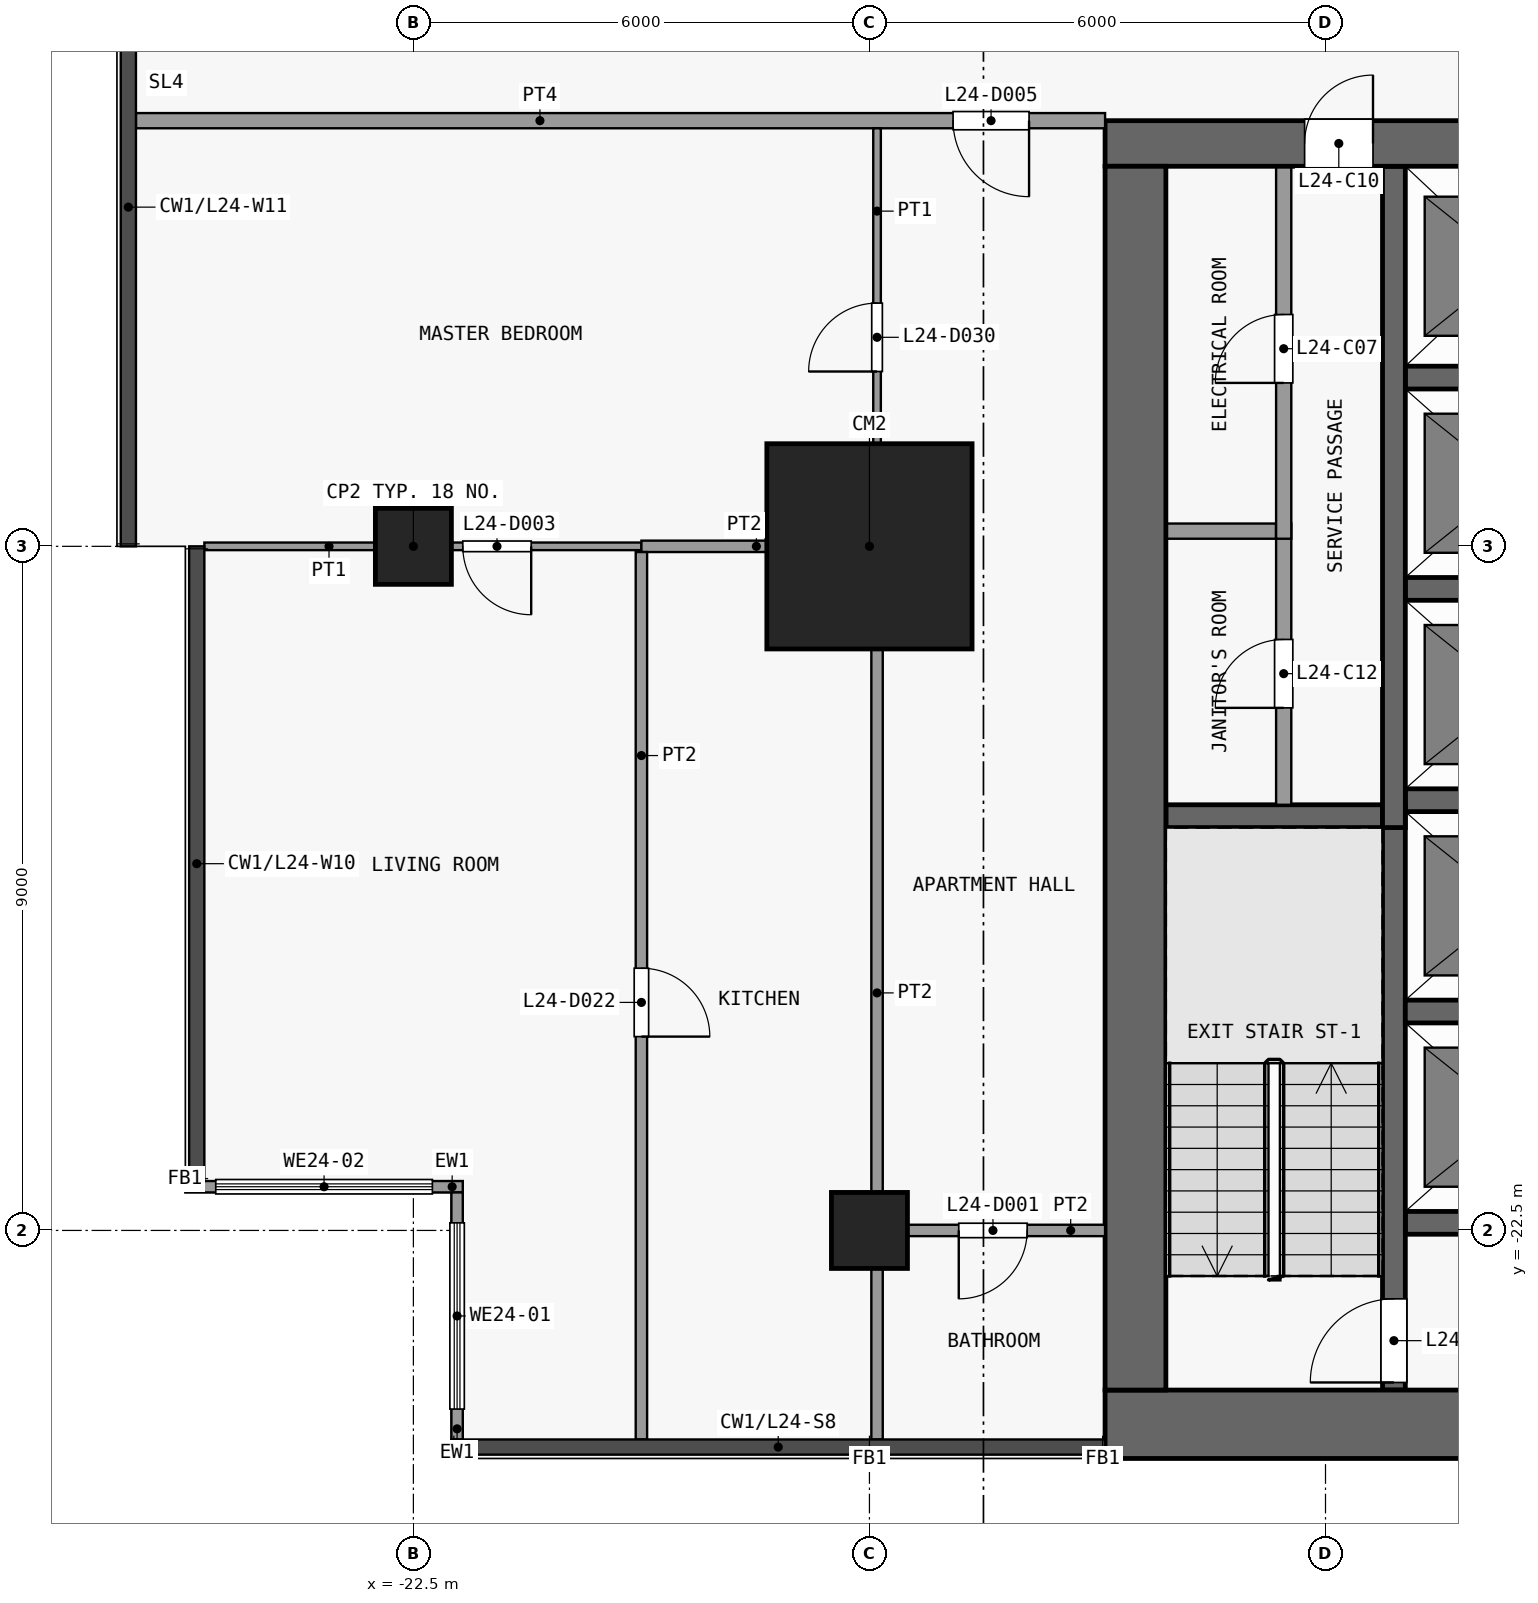
"""IFC4 building model, lengths in metres.
Left out: names, types, materials, properties, quantities, classifications, styles, units other than length and angle.
Written with IfcOpenShell. Run it as: python <this file> out.ifc"""

import sys

from ifc_helpers import new_model, si_unit, direction, frame, frame_2d, origin, origin_2d, place, context, subcontext, project, spatial, rectangle, extrude, element, fill, save


model = new_model("IFC4")
c1 = context("Model", 3, precision=1e-05, world=origin(), true_north=direction((0.0, 1.0)))
c2 = subcontext(c1, "Body", "Model", "MODEL_VIEW")
j1 = project(units=[si_unit("LENGTHUNIT", "METRE"), si_unit("PLANEANGLEUNIT", "RADIAN")], contexts=[c1])
p1 = place(None, origin())
s1 = spatial("IfcSite", under=j1, at=p1, CompositionType="ELEMENT")
p2 = place(p1, origin())
s2 = spatial("IfcBuilding", under=s1, at=p2, CompositionType="ELEMENT")
p3 = place(p2, frame((0.0, 0.0, 99.1)))
s3 = spatial("IfcBuildingStorey", under=s2, at=p3, CompositionType="ELEMENT", Elevation=99.1)
for number, where, z_axis, x_axis in (
    (1, (-22.5, -13.5, 0.0), (0.0, 0.0, 1.0), (1.0, 0.0, 0.0)),
    (2, (-16.5, -22.5, 0.0), (0.0, 0.0, 1.0), (1.0, 0.0, 0.0)),
):
    element("IfcColumn", number, at=place(p3, frame(where, z_axis=z_axis, x_axis=x_axis)), inside=s3, PredefinedType="COLUMN", context=c2, shape_type="SweptSolid", body=[
        extrude(rectangle(XDim=1.0, YDim=1.0, at=origin_2d()), origin(), (0.0, 0.0, 1.0), 3.6),
    ])
p4 = place(p3, frame((-16.5, -13.5, 0.0), z_axis=(0.0, 0.0, 1.0), x_axis=(1.0, 0.0, 0.0)))
e3 = element("IfcColumn", 3, at=p4, inside=s3, PredefinedType="COLUMN", context=c2, shape_type="SweptSolid", body=[
    extrude(rectangle(XDim=2.7, YDim=2.7, at=origin_2d()), origin(), (0.0, 0.0, 1.0), 3.6),
])
p5 = place(p3, frame((-13.4, -25.05, 0.0), z_axis=(0.0, 0.0, 1.0), x_axis=(1.0, 0.0, 0.0)))
e4 = element("IfcWall", 4, at=p5, inside=s3, PredefinedType="SHEAR", context=c2, shape_type="SweptSolid", body=[
    extrude(rectangle(XDim=26.8, YDim=0.9, at=frame_2d((13.4, 0.0))), origin(), (0.0, 0.0, 1.0), 3.3),
])
p6 = place(p3, frame((-13.4, -8.2, 0.0), z_axis=(0.0, 0.0, 1.0), x_axis=(1.0, 0.0, 0.0)))
e5 = element("IfcWall", 5, at=p6, inside=s3, PredefinedType="SHEAR", context=c2, shape_type="SweptSolid", body=[
    extrude(rectangle(XDim=26.8, YDim=0.6, at=frame_2d((13.4, 0.0))), origin(), (0.0, 0.0, 1.0), 3.3),
])
p7 = place(p6, frame((7.7, 0.0, 0.0)))
e6 = element("IfcOpeningElement", 6, at=p7, cuts=e5, PredefinedType="OPENING", context=c2, shape_type="SweptSolid", body=[
    extrude(rectangle(XDim=1.8, YDim=2.1, at=frame_2d((0.9, 1.05))), frame((0.0, 0.31, 0.0), z_axis=(0.0, -1.0, 0.0), x_axis=(1.0, 0.0, 0.0)), (0.0, 0.0, 1.0), 0.62),
])
p8 = place(p6, frame((17.3, 0.0, 0.0)))
e7 = element("IfcOpeningElement", 7, at=p8, cuts=e5, PredefinedType="OPENING", context=c2, shape_type="SweptSolid", body=[
    extrude(rectangle(XDim=1.8, YDim=2.1, at=frame_2d((0.9, 1.05))), frame((0.0, 0.31, 0.0), z_axis=(0.0, -1.0, 0.0), x_axis=(1.0, 0.0, 0.0)), (0.0, 0.0, 1.0), 0.62),
])
p9 = place(p6, frame((2.625, 0.0, 0.0)))
e8 = element("IfcOpeningElement", 8, at=p9, cuts=e5, PredefinedType="OPENING", context=c2, shape_type="SweptSolid", body=[
    extrude(rectangle(XDim=0.9, YDim=2.1, at=frame_2d((0.45, 1.05))), frame((0.0, 0.31, 0.0), z_axis=(0.0, -1.0, 0.0), x_axis=(1.0, 0.0, 0.0)), (0.0, 0.0, 1.0), 0.62),
])
p10 = place(p6, frame((23.275, 0.0, 0.0)))
e9 = element("IfcOpeningElement", 9, at=p10, cuts=e5, PredefinedType="OPENING", context=c2, shape_type="SweptSolid", body=[
    extrude(rectangle(XDim=0.9, YDim=2.1, at=frame_2d((0.45, 1.05))), frame((0.0, 0.31, 0.0), z_axis=(0.0, -1.0, 0.0), x_axis=(1.0, 0.0, 0.0)), (0.0, 0.0, 1.0), 0.62),
])
p11 = place(p3, frame((-13.0, -24.6, 0.0), z_axis=(0.0, 0.0, 1.0), x_axis=(0.0, 1.0, 0.0)))
e10 = element("IfcWall", 10, at=p11, inside=s3, PredefinedType="SHEAR", context=c2, shape_type="SweptSolid", body=[
    extrude(rectangle(XDim=16.1, YDim=0.8, at=frame_2d((8.05, 0.0))), origin(), (0.0, 0.0, 1.0), 3.3),
])
for number, where, z_axis, x_axis in (
    (11, (-9.45, -22.4, 0.0), (0.0, 0.0, 1.0), (1.0, 0.0, 0.0)),
    (12, (-9.45, -19.62, 0.0), (0.0, 0.0, 1.0), (1.0, 0.0, 0.0)),
):
    element("IfcWall", number, at=place(p3, frame(where, z_axis=z_axis, x_axis=x_axis)), inside=s3, PredefinedType="SHEAR", context=c2, shape_type="SweptSolid", body=[
        extrude(rectangle(XDim=2.8, YDim=0.3, at=frame_2d((1.4, 0.0))), origin(), (0.0, 0.0, 1.0), 3.3),
    ])
p12 = place(p3, frame((-12.6, -17.05, 0.0), z_axis=(0.0, 0.0, 1.0), x_axis=(1.0, 0.0, 0.0)))
e13 = element("IfcWall", 13, at=p12, inside=s3, PredefinedType="SHEAR", context=c2, shape_type="SweptSolid", body=[
    extrude(rectangle(XDim=2.85, YDim=0.3, at=frame_2d((1.425, 0.0))), origin(), (0.0, 0.0, 1.0), 3.3),
])
for number, where, z_axis, x_axis in (
    (14, (-9.45, -16.84, 0.0), (0.0, 0.0, 1.0), (1.0, 0.0, 0.0)),
    (15, (-9.45, -14.06, 0.0), (0.0, 0.0, 1.0), (1.0, 0.0, 0.0)),
):
    element("IfcWall", number, at=place(p3, frame(where, z_axis=z_axis, x_axis=x_axis)), inside=s3, PredefinedType="SHEAR", context=c2, shape_type="SweptSolid", body=[
        extrude(rectangle(XDim=2.8, YDim=0.3, at=frame_2d((1.4, 0.0))), origin(), (0.0, 0.0, 1.0), 3.3),
    ])
p13 = place(p3, frame((-12.6, -13.3, 0.0), z_axis=(0.0, 0.0, 1.0), x_axis=(1.0, 0.0, 0.0)))
e16 = element("IfcWall", 16, at=p13, inside=s3, PredefinedType="PARTITIONING", context=c2, shape_type="SweptSolid", body=[
    extrude(rectangle(XDim=1.45, YDim=0.2, at=frame_2d((0.725, 0.0))), origin(), (0.0, 0.0, 1.0), 3.3),
])
p14 = place(p3, frame((-9.45, -11.28, 0.0), z_axis=(0.0, 0.0, 1.0), x_axis=(1.0, 0.0, 0.0)))
e17 = element("IfcWall", 17, at=p14, inside=s3, PredefinedType="SHEAR", context=c2, shape_type="SweptSolid", body=[
    extrude(rectangle(XDim=2.8, YDim=0.3, at=frame_2d((1.4, 0.0))), origin(), (0.0, 0.0, 1.0), 3.3),
])
p15 = place(p3, frame((-11.05, -16.9, 0.0), z_axis=(0.0, 0.0, 1.0), x_axis=(0.0, 1.0, 0.0)))
e18 = element("IfcWall", 18, at=p15, inside=s3, PredefinedType="PARTITIONING", context=c2, shape_type="SweptSolid", body=[
    extrude(rectangle(XDim=3.7, YDim=0.2, at=frame_2d((1.85, 0.0))), origin(), (0.0, 0.0, 1.0), 3.3),
])
p16 = place(p15, frame((1.275, 0.0, 0.0)))
e19 = element("IfcOpeningElement", 19, at=p16, cuts=e18, PredefinedType="OPENING", context=c2, shape_type="SweptSolid", body=[
    extrude(rectangle(XDim=0.9, YDim=2.1, at=frame_2d((0.45, 1.05))), frame((0.0, 0.11, 0.0), z_axis=(0.0, -1.0, 0.0), x_axis=(1.0, 0.0, 0.0)), (0.0, 0.0, 1.0), 0.22),
])
p17 = place(p3, frame((-11.05, -13.4, 0.0), z_axis=(0.0, 0.0, 1.0), x_axis=(0.0, 1.0, 0.0)))
e20 = element("IfcWall", 20, at=p17, inside=s3, PredefinedType="PARTITIONING", context=c2, shape_type="SweptSolid", body=[
    extrude(rectangle(XDim=4.9, YDim=0.2, at=frame_2d((2.45, 0.0))), origin(), (0.0, 0.0, 1.0), 3.3),
])
p18 = place(p17, frame((2.05, 0.0, 0.0)))
e21 = element("IfcOpeningElement", 21, at=p18, cuts=e20, PredefinedType="OPENING", context=c2, shape_type="SweptSolid", body=[
    extrude(rectangle(XDim=0.9, YDim=2.1, at=frame_2d((0.45, 1.05))), frame((0.0, 0.11, 0.0), z_axis=(0.0, -1.0, 0.0), x_axis=(1.0, 0.0, 0.0)), (0.0, 0.0, 1.0), 0.22),
])
p19 = place(p3, frame((-9.6, -24.6, 0.0), z_axis=(0.0, 0.0, 1.0), x_axis=(0.0, 1.0, 0.0)))
e22 = element("IfcWall", 22, at=p19, inside=s3, PredefinedType="SHEAR", context=c2, shape_type="SweptSolid", body=[
    extrude(rectangle(XDim=7.7, YDim=0.3, at=frame_2d((3.85, 0.0))), origin(), (0.0, 0.0, 1.0), 3.3),
])
p20 = place(p19, frame((0.1, 0.0, 0.0)))
e23 = element("IfcOpeningElement", 23, at=p20, cuts=e22, PredefinedType="OPENING", context=c2, shape_type="SweptSolid", body=[
    extrude(rectangle(XDim=1.1, YDim=2.1, at=frame_2d((0.55, 1.05))), frame((0.0, 0.16, 0.0), z_axis=(0.0, -1.0, 0.0), x_axis=(1.0, 0.0, 0.0)), (0.0, 0.0, 1.0), 0.32),
])
p21 = place(p3, frame((-9.6, -17.2, 0.0), z_axis=(0.0, 0.0, 1.0), x_axis=(0.0, 1.0, 0.0)))
e24 = element("IfcWall", 24, at=p21, inside=s3, PredefinedType="SHEAR", context=c2, shape_type="SweptSolid", body=[
    extrude(rectangle(XDim=8.7, YDim=0.3, at=frame_2d((4.35, 0.0))), origin(), (0.0, 0.0, 1.0), 3.3),
])
p22 = place(p3, frame((-21.925, -25.25, 0.0), z_axis=(0.0, 0.0, 1.0), x_axis=(0.0, 1.0, 0.0)))
e25 = element("IfcWall", 25, at=p22, inside=s3, PredefinedType="SOLIDWALL", context=c2, shape_type="SweptSolid", body=[
    extrude(rectangle(XDim=3.25, YDim=0.15, at=frame_2d((1.625, 0.0))), origin(), (0.0, 0.0, 1.0), 3.3),
])
p23 = place(p22, frame((0.4, 0.0, 0.9)))
e26 = element("IfcOpeningElement", 26, at=p23, cuts=e25, PredefinedType="OPENING", context=c2, shape_type="SweptSolid", body=[
    extrude(rectangle(XDim=2.45, YDim=2.4, at=frame_2d((1.225, 1.2))), frame((0.0, 0.085, 0.0), z_axis=(0.0, -1.0, 0.0), x_axis=(1.0, 0.0, 0.0)), (0.0, 0.0, 1.0), 0.17),
])
p24 = place(p3, frame((-21.85, -21.925, 0.0), z_axis=(0.0, 0.0, 1.0), x_axis=(-1.0, 0.0, 0.0)))
e27 = element("IfcWall", 27, at=p24, inside=s3, PredefinedType="SOLIDWALL", context=c2, shape_type="SweptSolid", body=[
    extrude(rectangle(XDim=3.65, YDim=0.15, at=frame_2d((1.825, 0.0))), origin(), (0.0, 0.0, 1.0), 3.3),
])
p25 = place(p24, frame((0.4, 0.0, 0.9)))
e28 = element("IfcOpeningElement", 28, at=p25, cuts=e27, PredefinedType="OPENING", context=c2, shape_type="SweptSolid", body=[
    extrude(rectangle(XDim=2.85, YDim=2.4, at=frame_2d((1.425, 1.2))), frame((0.0, 0.085, 0.0), z_axis=(0.0, -1.0, 0.0), x_axis=(1.0, 0.0, 0.0)), (0.0, 0.0, 1.0), 0.17),
])
p26 = place(p3, frame((-16.325, -22.5, 0.0), z_axis=(0.0, 0.0, 1.0), x_axis=(1.0, 0.0, 0.0)))
e29 = element("IfcWall", 29, at=p26, inside=s3, PredefinedType="PARTITIONING", context=c2, shape_type="SweptSolid", body=[
    extrude(rectangle(XDim=2.925, YDim=0.15, at=frame_2d((1.462, 0.0))), origin(), (0.0, 0.0, 1.0), 3.3),
])
p27 = place(p26, frame((1.0, 0.0, 0.0)))
e30 = element("IfcOpeningElement", 30, at=p27, cuts=e29, PredefinedType="OPENING", context=c2, shape_type="SweptSolid", body=[
    extrude(rectangle(XDim=0.9, YDim=2.1, at=frame_2d((0.45, 1.05))), frame((0.0, 0.085, 0.0), z_axis=(0.0, -1.0, 0.0), x_axis=(1.0, 0.0, 0.0)), (0.0, 0.0, 1.0), 0.17),
])
p28 = place(p3, frame((-25.25, -13.5, 0.0), z_axis=(0.0, 0.0, 1.0), x_axis=(1.0, 0.0, 0.0)))
e31 = element("IfcWall", 31, at=p28, inside=s3, PredefinedType="PARTITIONING", context=c2, shape_type="SweptSolid", body=[
    extrude(rectangle(XDim=5.75, YDim=0.1, at=frame_2d((2.875, 0.0))), origin(), (0.0, 0.0, 1.0), 3.3),
])
p29 = place(p28, frame((3.4, 0.0, 0.0)))
e32 = element("IfcOpeningElement", 32, at=p29, cuts=e31, PredefinedType="OPENING", context=c2, shape_type="SweptSolid", body=[
    extrude(rectangle(XDim=0.9, YDim=2.1, at=frame_2d((0.45, 1.05))), frame((0.0, 0.06, 0.0), z_axis=(0.0, -1.0, 0.0), x_axis=(1.0, 0.0, 0.0)), (0.0, 0.0, 1.0), 0.12),
])
p30 = place(p3, frame((-19.5, -13.5, 0.0), z_axis=(0.0, 0.0, 1.0), x_axis=(1.0, 0.0, 0.0)))
e33 = element("IfcWall", 33, at=p30, inside=s3, PredefinedType="PARTITIONING", context=c2, shape_type="SweptSolid", body=[
    extrude(rectangle(XDim=3.025, YDim=0.15, at=frame_2d((1.512, 0.0))), origin(), (0.0, 0.0, 1.0), 3.3),
])
p31 = place(p3, frame((-26.15, -7.9, 0.0), z_axis=(0.0, 0.0, 1.0), x_axis=(1.0, 0.0, 0.0)))
e34 = element("IfcWall", 34, at=p31, inside=s3, PredefinedType="PARTITIONING", context=c2, shape_type="SweptSolid", body=[
    extrude(rectangle(XDim=12.75, YDim=0.2, at=frame_2d((6.375, 0.0))), origin(), (0.0, 0.0, 1.0), 3.3),
])
p32 = place(p31, frame((10.75, 0.0, 0.0)))
e35 = element("IfcOpeningElement", 35, at=p32, cuts=e34, PredefinedType="OPENING", context=c2, shape_type="SweptSolid", body=[
    extrude(rectangle(XDim=1.0, YDim=2.1, at=frame_2d((0.5, 1.05))), frame((0.0, 0.11, 0.0), z_axis=(0.0, -1.0, 0.0), x_axis=(1.0, 0.0, 0.0)), (0.0, 0.0, 1.0), 0.22),
])
p33 = place(p3, frame((-19.5, -25.25, 0.0), z_axis=(0.0, 0.0, 1.0), x_axis=(0.0, 1.0, 0.0)))
e36 = element("IfcWall", 36, at=p33, inside=s3, PredefinedType="PARTITIONING", context=c2, shape_type="SweptSolid", body=[
    extrude(rectangle(XDim=11.675, YDim=0.15, at=frame_2d((5.837, 0.0))), origin(), (0.0, 0.0, 1.0), 3.3),
])
p34 = place(p33, frame((5.3, 0.0, 0.0)))
e37 = element("IfcOpeningElement", 37, at=p34, cuts=e36, PredefinedType="OPENING", context=c2, shape_type="SweptSolid", body=[
    extrude(rectangle(XDim=0.9, YDim=2.1, at=frame_2d((0.45, 1.05))), frame((0.0, 0.085, 0.0), z_axis=(0.0, -1.0, 0.0), x_axis=(1.0, 0.0, 0.0)), (0.0, 0.0, 1.0), 0.17),
])
p35 = place(p3, frame((-16.4, -13.5, 0.0), z_axis=(0.0, 0.0, 1.0), x_axis=(0.0, 1.0, 0.0)))
e38 = element("IfcWall", 38, at=p35, inside=s3, PredefinedType="PARTITIONING", context=c2, shape_type="SweptSolid", body=[
    extrude(rectangle(XDim=5.5, YDim=0.1, at=frame_2d((2.75, 0.0))), origin(), (0.0, 0.0, 1.0), 3.3),
])
p36 = place(p35, frame((2.3, 0.0, 0.0)))
e39 = element("IfcOpeningElement", 39, at=p36, cuts=e38, PredefinedType="OPENING", context=c2, shape_type="SweptSolid", body=[
    extrude(rectangle(XDim=0.9, YDim=2.1, at=frame_2d((0.45, 1.05))), frame((0.0, 0.06, 0.0), z_axis=(0.0, -1.0, 0.0), x_axis=(1.0, 0.0, 0.0)), (0.0, 0.0, 1.0), 0.12),
])
p37 = place(p3, frame((-16.4, -25.25, 0.0), z_axis=(0.0, 0.0, 1.0), x_axis=(0.0, 1.0, 0.0)))
e40 = element("IfcWall", 40, at=p37, inside=s3, PredefinedType="PARTITIONING", context=c2, shape_type="SweptSolid", body=[
    extrude(rectangle(XDim=11.75, YDim=0.15, at=frame_2d((5.875, 0.0))), origin(), (0.0, 0.0, 1.0), 3.3),
])
p38 = place(p18, origin())
e41 = element("IfcDoor", 41, at=p38, inside=s3, OperationType="SINGLE_SWING_LEFT", PredefinedType="DOOR", context=c2, shape_type="SweptSolid", body=[
    extrude(rectangle(XDim=0.9, YDim=2.1, at=frame_2d((0.45, 1.05))), frame((0.0, 0.025, 0.0), z_axis=(0.0, -1.0, 0.0), x_axis=(1.0, 0.0, 0.0)), (0.0, 0.0, 1.0), 0.05),
])
fill(e21, e41)
p39 = place(p9, origin())
e42 = element("IfcDoor", 42, at=p39, inside=s3, OperationType="SINGLE_SWING_RIGHT", PredefinedType="DOOR", context=c2, shape_type="SweptSolid", body=[
    extrude(rectangle(XDim=0.9, YDim=2.1, at=frame_2d((0.45, 1.05))), frame((0.0, 0.025, 0.0), z_axis=(0.0, -1.0, 0.0), x_axis=(1.0, 0.0, 0.0)), (0.0, 0.0, 1.0), 0.05),
])
fill(e8, e42)
p40 = place(p16, origin())
e43 = element("IfcDoor", 43, at=p40, inside=s3, OperationType="SINGLE_SWING_LEFT", PredefinedType="DOOR", context=c2, shape_type="SweptSolid", body=[
    extrude(rectangle(XDim=0.9, YDim=2.1, at=frame_2d((0.45, 1.05))), frame((0.0, 0.025, 0.0), z_axis=(0.0, -1.0, 0.0), x_axis=(1.0, 0.0, 0.0)), (0.0, 0.0, 1.0), 0.05),
])
fill(e19, e43)
p41 = place(p20, origin())
e44 = element("IfcDoor", 44, at=p41, inside=s3, OperationType="SINGLE_SWING_LEFT", PredefinedType="DOOR", context=c2, shape_type="SweptSolid", body=[
    extrude(rectangle(XDim=1.1, YDim=2.1, at=frame_2d((0.55, 1.05))), frame((0.0, 0.025, 0.0), z_axis=(0.0, -1.0, 0.0), x_axis=(1.0, 0.0, 0.0)), (0.0, 0.0, 1.0), 0.05),
])
fill(e23, e44)
p42 = place(p23, origin())
e45 = element("IfcWindow", 45, at=p42, inside=s3, PartitioningType="SINGLE_PANEL", PredefinedType="WINDOW", context=c2, shape_type="SweptSolid", body=[
    extrude(rectangle(XDim=2.45, YDim=2.4, at=frame_2d((1.225, 1.2))), frame((0.0, 0.03, 0.0), z_axis=(0.0, -1.0, 0.0), x_axis=(1.0, 0.0, 0.0)), (0.0, 0.0, 1.0), 0.06),
])
fill(e26, e45)
p43 = place(p25, origin())
e46 = element("IfcWindow", 46, at=p43, inside=s3, PartitioningType="SINGLE_PANEL", PredefinedType="WINDOW", context=c2, shape_type="SweptSolid", body=[
    extrude(rectangle(XDim=2.85, YDim=2.4, at=frame_2d((1.425, 1.2))), frame((0.0, 0.03, 0.0), z_axis=(0.0, -1.0, 0.0), x_axis=(1.0, 0.0, 0.0)), (0.0, 0.0, 1.0), 0.06),
])
fill(e28, e46)
p44 = place(p27, origin())
e47 = element("IfcDoor", 47, at=p44, inside=s3, OperationType="SINGLE_SWING_LEFT", PredefinedType="DOOR", context=c2, shape_type="SweptSolid", body=[
    extrude(rectangle(XDim=0.9, YDim=2.1, at=frame_2d((0.45, 1.05))), frame((0.0, 0.025, 0.0), z_axis=(0.0, -1.0, 0.0), x_axis=(1.0, 0.0, 0.0)), (0.0, 0.0, 1.0), 0.05),
])
fill(e30, e47)
p45 = place(p29, origin())
e48 = element("IfcDoor", 48, at=p45, inside=s3, OperationType="SINGLE_SWING_RIGHT", PredefinedType="DOOR", context=c2, shape_type="SweptSolid", body=[
    extrude(rectangle(XDim=0.9, YDim=2.1, at=frame_2d((0.45, 1.05))), frame((0.0, 0.025, 0.0), z_axis=(0.0, -1.0, 0.0), x_axis=(1.0, 0.0, 0.0)), (0.0, 0.0, 1.0), 0.05),
])
fill(e32, e48)
p46 = place(p32, origin())
e49 = element("IfcDoor", 49, at=p46, inside=s3, OperationType="SINGLE_SWING_RIGHT", PredefinedType="DOOR", context=c2, shape_type="SweptSolid", body=[
    extrude(rectangle(XDim=1.0, YDim=2.1, at=frame_2d((0.5, 1.05))), frame((0.0, 0.025, 0.0), z_axis=(0.0, -1.0, 0.0), x_axis=(1.0, 0.0, 0.0)), (0.0, 0.0, 1.0), 0.05),
])
fill(e35, e49)
p47 = place(p34, origin())
e50 = element("IfcDoor", 50, at=p47, inside=s3, OperationType="SINGLE_SWING_LEFT", PredefinedType="DOOR", context=c2, shape_type="SweptSolid", body=[
    extrude(rectangle(XDim=0.9, YDim=2.1, at=frame_2d((0.45, 1.05))), frame((0.0, 0.025, 0.0), z_axis=(0.0, -1.0, 0.0), x_axis=(1.0, 0.0, 0.0)), (0.0, 0.0, 1.0), 0.05),
])
fill(e37, e50)
p48 = place(p36, origin())
e51 = element("IfcDoor", 51, at=p48, inside=s3, OperationType="SINGLE_SWING_RIGHT", PredefinedType="DOOR", context=c2, shape_type="SweptSolid", body=[
    extrude(rectangle(XDim=0.9, YDim=2.1, at=frame_2d((0.45, 1.05))), frame((0.0, 0.025, 0.0), z_axis=(0.0, -1.0, 0.0), x_axis=(1.0, 0.0, 0.0)), (0.0, 0.0, 1.0), 0.05),
])
fill(e39, e51)
save(model, sys.argv[1])
